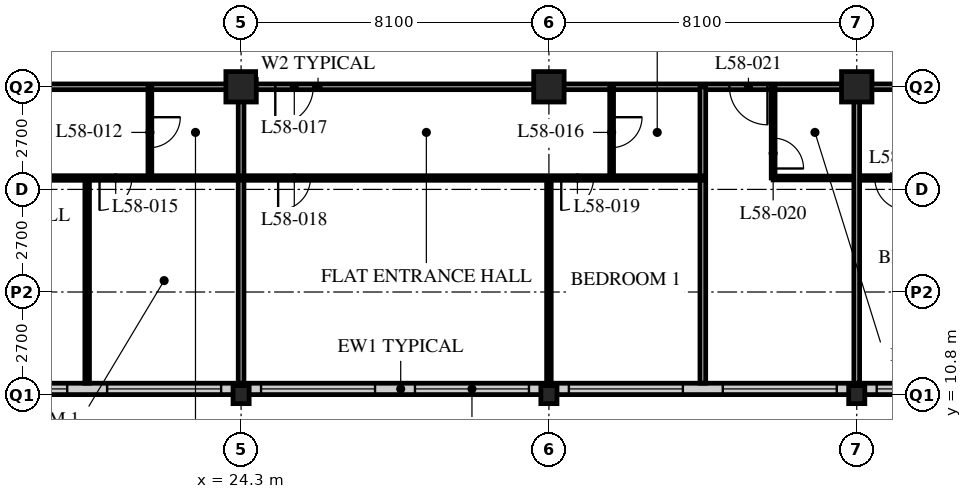
"""IFC4 building model, lengths in metres.
Left out: names, types, materials, properties, quantities, classifications, styles, units other than length and angle.
Written with IfcOpenShell. Run it as: python <this file> out.ifc"""

import sys

from ifc_helpers import new_model, si_unit, direction, frame, frame_2d, origin, origin_2d, place, context, subcontext, project, spatial, rectangle, hollow_rectangle, i_section, extrude, element, fill, save


model = new_model("IFC4")
c1 = context("Model", 3, precision=1e-05, world=origin(), true_north=direction((0.0, 1.0)))
c2 = subcontext(c1, "Body", "Model", "MODEL_VIEW")
j1 = project(units=[si_unit("LENGTHUNIT", "METRE"), si_unit("PLANEANGLEUNIT", "RADIAN")], contexts=[c1])
p1 = place(None, origin())
s1 = spatial("IfcSite", under=j1, at=p1, CompositionType="ELEMENT")
p2 = place(p1, origin())
s2 = spatial("IfcBuilding", under=s1, at=p2, CompositionType="ELEMENT")
p3 = place(p2, frame((0.0, 0.0, 224.4)))
s3 = spatial("IfcBuildingStorey", under=s2, at=p3, CompositionType="ELEMENT", Elevation=224.4)
p4 = place(p3, frame((24.3, 10.8, 0.0), z_axis=(0.0, 0.0, 1.0), x_axis=(1.0, 0.0, 0.0)))
e1 = element("IfcColumn", 1, at=p4, inside=s3, PredefinedType="COLUMN", context=c2, shape_type="SweptSolid", body=[
    extrude(i_section(OverallWidth=0.424, OverallDepth=0.475, WebThickness=0.048, FlangeThickness=0.077, FilletRadius=0.015, at=origin_2d()), origin(), (0.0, 0.0, 1.0), 3.6),
])
p5 = place(p3, frame((24.3, 18.9, 0.0), z_axis=(0.0, 0.0, 1.0), x_axis=(1.0, 0.0, 0.0)))
e2 = element("IfcColumn", 2, at=p5, inside=s3, PredefinedType="COLUMN", context=c2, shape_type="SweptSolid", body=[
    extrude(hollow_rectangle(XDim=0.8, YDim=0.8, WallThickness=0.08, at=origin_2d()), origin(), (0.0, 0.0, 1.0), 3.6),
])
p6 = place(p3, frame((32.4, 10.8, 0.0), z_axis=(0.0, 0.0, 1.0), x_axis=(1.0, 0.0, 0.0)))
e3 = element("IfcColumn", 3, at=p6, inside=s3, PredefinedType="COLUMN", context=c2, shape_type="SweptSolid", body=[
    extrude(i_section(OverallWidth=0.424, OverallDepth=0.475, WebThickness=0.048, FlangeThickness=0.077, FilletRadius=0.015, at=origin_2d()), origin(), (0.0, 0.0, 1.0), 3.6),
])
p7 = place(p3, frame((32.4, 18.9, 0.0), z_axis=(0.0, 0.0, 1.0), x_axis=(1.0, 0.0, 0.0)))
e4 = element("IfcColumn", 4, at=p7, inside=s3, PredefinedType="COLUMN", context=c2, shape_type="SweptSolid", body=[
    extrude(hollow_rectangle(XDim=0.8, YDim=0.8, WallThickness=0.08, at=origin_2d()), origin(), (0.0, 0.0, 1.0), 3.6),
])
p8 = place(p3, frame((40.5, 10.8, 0.0), z_axis=(0.0, 0.0, 1.0), x_axis=(1.0, 0.0, 0.0)))
e5 = element("IfcColumn", 5, at=p8, inside=s3, PredefinedType="COLUMN", context=c2, shape_type="SweptSolid", body=[
    extrude(i_section(OverallWidth=0.424, OverallDepth=0.475, WebThickness=0.048, FlangeThickness=0.077, FilletRadius=0.015, at=origin_2d()), origin(), (0.0, 0.0, 1.0), 3.6),
])
p9 = place(p3, frame((40.5, 18.9, 0.0), z_axis=(0.0, 0.0, 1.0), x_axis=(1.0, 0.0, 0.0)))
e6 = element("IfcColumn", 6, at=p9, inside=s3, PredefinedType="COLUMN", context=c2, shape_type="SweptSolid", body=[
    extrude(hollow_rectangle(XDim=0.8, YDim=0.8, WallThickness=0.08, at=origin_2d()), origin(), (0.0, 0.0, 1.0), 3.6),
])
p10 = place(p3, frame((8.4, 10.95, 0.0), z_axis=(0.0, 0.0, 1.0), x_axis=(1.0, 0.0, 0.0)))
e7 = element("IfcWall", 7, at=p10, inside=s3, PredefinedType="SOLIDWALL", context=c2, shape_type="SweptSolid", body=[
    extrude(rectangle(XDim=40.2, YDim=0.3, at=frame_2d((20.1, 0.0))), origin(), (0.0, 0.0, 1.0), 3.39),
])
p11 = place(p10, frame((0.225, 0.0, 0.6)))
e8 = element("IfcOpeningElement", 8, at=p11, cuts=e7, PredefinedType="OPENING", context=c2, shape_type="SweptSolid", body=[
    extrude(rectangle(XDim=3.0, YDim=2.0, at=frame_2d((1.5, 1.0))), frame((0.0, 0.16, 0.0), z_axis=(0.0, -1.0, 0.0), x_axis=(1.0, 0.0, 0.0)), (0.0, 0.0, 1.0), 0.32),
])
p12 = place(p10, frame((4.275, 0.0, 0.6)))
e9 = element("IfcOpeningElement", 9, at=p12, cuts=e7, PredefinedType="OPENING", context=c2, shape_type="SweptSolid", body=[
    extrude(rectangle(XDim=3.0, YDim=2.0, at=frame_2d((1.5, 1.0))), frame((0.0, 0.16, 0.0), z_axis=(0.0, -1.0, 0.0), x_axis=(1.0, 0.0, 0.0)), (0.0, 0.0, 1.0), 0.32),
])
p13 = place(p10, frame((8.325, 0.0, 0.6)))
e10 = element("IfcOpeningElement", 10, at=p13, cuts=e7, PredefinedType="OPENING", context=c2, shape_type="SweptSolid", body=[
    extrude(rectangle(XDim=3.0, YDim=2.0, at=frame_2d((1.5, 1.0))), frame((0.0, 0.16, 0.0), z_axis=(0.0, -1.0, 0.0), x_axis=(1.0, 0.0, 0.0)), (0.0, 0.0, 1.0), 0.32),
])
p14 = place(p10, frame((12.375, 0.0, 0.6)))
e11 = element("IfcOpeningElement", 11, at=p14, cuts=e7, PredefinedType="OPENING", context=c2, shape_type="SweptSolid", body=[
    extrude(rectangle(XDim=3.0, YDim=2.0, at=frame_2d((1.5, 1.0))), frame((0.0, 0.16, 0.0), z_axis=(0.0, -1.0, 0.0), x_axis=(1.0, 0.0, 0.0)), (0.0, 0.0, 1.0), 0.32),
])
p15 = place(p10, frame((16.425, 0.0, 0.6)))
e12 = element("IfcOpeningElement", 12, at=p15, cuts=e7, PredefinedType="OPENING", context=c2, shape_type="SweptSolid", body=[
    extrude(rectangle(XDim=3.0, YDim=2.0, at=frame_2d((1.5, 1.0))), frame((0.0, 0.16, 0.0), z_axis=(0.0, -1.0, 0.0), x_axis=(1.0, 0.0, 0.0)), (0.0, 0.0, 1.0), 0.32),
])
p16 = place(p10, frame((20.475, 0.0, 0.6)))
e13 = element("IfcOpeningElement", 13, at=p16, cuts=e7, PredefinedType="OPENING", context=c2, shape_type="SweptSolid", body=[
    extrude(rectangle(XDim=3.0, YDim=2.0, at=frame_2d((1.5, 1.0))), frame((0.0, 0.16, 0.0), z_axis=(0.0, -1.0, 0.0), x_axis=(1.0, 0.0, 0.0)), (0.0, 0.0, 1.0), 0.32),
])
p17 = place(p10, frame((24.525, 0.0, 0.6)))
e14 = element("IfcOpeningElement", 14, at=p17, cuts=e7, PredefinedType="OPENING", context=c2, shape_type="SweptSolid", body=[
    extrude(rectangle(XDim=3.0, YDim=2.0, at=frame_2d((1.5, 1.0))), frame((0.0, 0.16, 0.0), z_axis=(0.0, -1.0, 0.0), x_axis=(1.0, 0.0, 0.0)), (0.0, 0.0, 1.0), 0.32),
])
p18 = place(p10, frame((28.575, 0.0, 0.6)))
e15 = element("IfcOpeningElement", 15, at=p18, cuts=e7, PredefinedType="OPENING", context=c2, shape_type="SweptSolid", body=[
    extrude(rectangle(XDim=3.0, YDim=2.0, at=frame_2d((1.5, 1.0))), frame((0.0, 0.16, 0.0), z_axis=(0.0, -1.0, 0.0), x_axis=(1.0, 0.0, 0.0)), (0.0, 0.0, 1.0), 0.32),
])
p19 = place(p10, frame((32.625, 0.0, 0.6)))
e16 = element("IfcOpeningElement", 16, at=p19, cuts=e7, PredefinedType="OPENING", context=c2, shape_type="SweptSolid", body=[
    extrude(rectangle(XDim=3.0, YDim=2.0, at=frame_2d((1.5, 1.0))), frame((0.0, 0.16, 0.0), z_axis=(0.0, -1.0, 0.0), x_axis=(1.0, 0.0, 0.0)), (0.0, 0.0, 1.0), 0.32),
])
p20 = place(p10, frame((36.675, 0.0, 0.6)))
e17 = element("IfcOpeningElement", 17, at=p20, cuts=e7, PredefinedType="OPENING", context=c2, shape_type="SweptSolid", body=[
    extrude(rectangle(XDim=3.0, YDim=2.0, at=frame_2d((1.5, 1.0))), frame((0.0, 0.16, 0.0), z_axis=(0.0, -1.0, 0.0), x_axis=(1.0, 0.0, 0.0)), (0.0, 0.0, 1.0), 0.32),
])
p21 = place(p3, frame((8.1, 18.9, 0.0), z_axis=(0.0, 0.0, 1.0), x_axis=(1.0, 0.0, 0.0)))
e18 = element("IfcWall", 18, at=p21, inside=s3, PredefinedType="PARTITIONING", context=c2, shape_type="SweptSolid", body=[
    extrude(rectangle(XDim=36.45, YDim=0.15, at=frame_2d((18.225, 0.0))), origin(), (0.0, 0.0, 1.0), 2.628),
])
p22 = place(p21, frame((4.45, 0.0, 0.0)))
e19 = element("IfcOpeningElement", 19, at=p22, cuts=e18, PredefinedType="OPENING", context=c2, shape_type="SweptSolid", body=[
    extrude(rectangle(XDim=1.0, YDim=2.1, at=frame_2d((0.5, 1.05))), frame((0.0, 0.085, 0.0), z_axis=(0.0, -1.0, 0.0), x_axis=(1.0, 0.0, 0.0)), (0.0, 0.0, 1.0), 0.17),
])
p23 = place(p21, frame((17.1, 0.0, 0.0)))
e20 = element("IfcOpeningElement", 20, at=p23, cuts=e18, PredefinedType="OPENING", context=c2, shape_type="SweptSolid", body=[
    extrude(rectangle(XDim=1.0, YDim=2.1, at=frame_2d((0.5, 1.05))), frame((0.0, 0.085, 0.0), z_axis=(0.0, -1.0, 0.0), x_axis=(1.0, 0.0, 0.0)), (0.0, 0.0, 1.0), 0.17),
])
p24 = place(p21, frame((29.05, 0.0, 0.0)))
e21 = element("IfcOpeningElement", 21, at=p24, cuts=e18, PredefinedType="OPENING", context=c2, shape_type="SweptSolid", body=[
    extrude(rectangle(XDim=1.0, YDim=2.1, at=frame_2d((0.5, 1.05))), frame((0.0, 0.085, 0.0), z_axis=(0.0, -1.0, 0.0), x_axis=(1.0, 0.0, 0.0)), (0.0, 0.0, 1.0), 0.17),
])
p25 = place(p21, frame((2.625, 0.0, 0.0)))
e22 = element("IfcOpeningElement", 22, at=p25, cuts=e18, PredefinedType="OPENING", context=c2, shape_type="SweptSolid", body=[
    extrude(rectangle(XDim=1.0, YDim=2.1, at=frame_2d((0.5, 1.05))), frame((0.0, 0.085, 0.0), z_axis=(0.0, -1.0, 0.0), x_axis=(1.0, 0.0, 0.0)), (0.0, 0.0, 1.0), 0.17),
])
p26 = place(p21, frame((33.925, 0.0, 0.0)))
e23 = element("IfcOpeningElement", 23, at=p26, cuts=e18, PredefinedType="OPENING", context=c2, shape_type="SweptSolid", body=[
    extrude(rectangle(XDim=1.0, YDim=2.1, at=frame_2d((0.5, 1.05))), frame((0.0, 0.085, 0.0), z_axis=(0.0, -1.0, 0.0), x_axis=(1.0, 0.0, 0.0)), (0.0, 0.0, 1.0), 0.17),
])
p27 = place(p3, frame((21.9, 18.9, 0.0), z_axis=(0.0, 0.0, 1.0), x_axis=(0.0, -1.0, 0.0)))
e24 = element("IfcWall", 24, at=p27, inside=s3, PredefinedType="PARTITIONING", context=c2, shape_type="SweptSolid", body=[
    extrude(rectangle(XDim=2.4, YDim=0.1, at=frame_2d((1.2, 0.0))), origin(), (0.0, 0.0, 1.0), 3.39),
])
p28 = place(p27, frame((0.8, 0.0, 0.0)))
e25 = element("IfcOpeningElement", 25, at=p28, cuts=e24, PredefinedType="OPENING", context=c2, shape_type="SweptSolid", body=[
    extrude(rectangle(XDim=0.8, YDim=2.1, at=frame_2d((0.4, 1.05))), frame((0.0, 0.06, 0.0), z_axis=(0.0, -1.0, 0.0), x_axis=(1.0, 0.0, 0.0)), (0.0, 0.0, 1.0), 0.12),
])
p29 = place(p3, frame((20.25, 16.5, 0.0), z_axis=(0.0, 0.0, 1.0), x_axis=(0.0, -1.0, 0.0)))
e26 = element("IfcWall", 26, at=p29, inside=s3, PredefinedType="PARTITIONING", context=c2, shape_type="SweptSolid", body=[
    extrude(rectangle(XDim=5.4, YDim=0.12, at=frame_2d((2.7, 0.0))), origin(), (0.0, 0.0, 1.0), 3.39),
])
p30 = place(p3, frame((24.3, 18.9, 0.0), z_axis=(0.0, 0.0, 1.0), x_axis=(0.0, -1.0, 0.0)))
e27 = element("IfcWall", 27, at=p30, inside=s3, PredefinedType="PARTITIONING", context=c2, shape_type="SweptSolid", body=[
    extrude(rectangle(XDim=7.8, YDim=0.15, at=frame_2d((3.9, 0.0))), origin(), (0.0, 0.0, 1.0), 2.628),
])
p31 = place(p3, frame((34.05, 18.9, 0.0), z_axis=(0.0, 0.0, 1.0), x_axis=(0.0, -1.0, 0.0)))
e28 = element("IfcWall", 28, at=p31, inside=s3, PredefinedType="PARTITIONING", context=c2, shape_type="SweptSolid", body=[
    extrude(rectangle(XDim=2.4, YDim=0.1, at=frame_2d((1.2, 0.0))), origin(), (0.0, 0.0, 1.0), 3.39),
])
p32 = place(p31, frame((0.8, 0.0, 0.0)))
e29 = element("IfcOpeningElement", 29, at=p32, cuts=e28, PredefinedType="OPENING", context=c2, shape_type="SweptSolid", body=[
    extrude(rectangle(XDim=0.8, YDim=2.1, at=frame_2d((0.4, 1.05))), frame((0.0, 0.06, 0.0), z_axis=(0.0, -1.0, 0.0), x_axis=(1.0, 0.0, 0.0)), (0.0, 0.0, 1.0), 0.12),
])
p33 = place(p3, frame((32.4, 16.5, 0.0), z_axis=(0.0, 0.0, 1.0), x_axis=(0.0, -1.0, 0.0)))
e30 = element("IfcWall", 30, at=p33, inside=s3, PredefinedType="PARTITIONING", context=c2, shape_type="SweptSolid", body=[
    extrude(rectangle(XDim=5.4, YDim=0.12, at=frame_2d((2.7, 0.0))), origin(), (0.0, 0.0, 1.0), 2.628),
])
p34 = place(p3, frame((36.45, 18.9, 0.0), z_axis=(0.0, 0.0, 1.0), x_axis=(0.0, -1.0, 0.0)))
e31 = element("IfcWall", 31, at=p34, inside=s3, PredefinedType="PARTITIONING", context=c2, shape_type="SweptSolid", body=[
    extrude(rectangle(XDim=7.8, YDim=0.15, at=frame_2d((3.9, 0.0))), origin(), (0.0, 0.0, 1.0), 3.39),
])
p35 = place(p3, frame((38.3, 16.5, 0.0), z_axis=(0.0, 0.0, 1.0), x_axis=(1.0, 0.0, 0.0)))
e32 = element("IfcWall", 32, at=p35, inside=s3, PredefinedType="PARTITIONING", context=c2, shape_type="SweptSolid", body=[
    extrude(rectangle(XDim=2.2, YDim=0.1, at=frame_2d((1.1, 0.0))), origin(), (0.0, 0.0, 1.0), 3.39),
])
p36 = place(p3, frame((38.3, 18.9, 0.0), z_axis=(0.0, 0.0, 1.0), x_axis=(0.0, -1.0, 0.0)))
e33 = element("IfcWall", 33, at=p36, inside=s3, PredefinedType="PARTITIONING", context=c2, shape_type="SweptSolid", body=[
    extrude(rectangle(XDim=2.4, YDim=0.1, at=frame_2d((1.2, 0.0))), origin(), (0.0, 0.0, 1.0), 3.39),
])
p37 = place(p36, frame((1.35, 0.0, 0.0)))
e34 = element("IfcOpeningElement", 34, at=p37, cuts=e33, PredefinedType="OPENING", context=c2, shape_type="SweptSolid", body=[
    extrude(rectangle(XDim=0.8, YDim=2.1, at=frame_2d((0.4, 1.05))), frame((0.0, 0.06, 0.0), z_axis=(0.0, -1.0, 0.0), x_axis=(1.0, 0.0, 0.0)), (0.0, 0.0, 1.0), 0.12),
])
p38 = place(p3, frame((8.1, 16.5, 0.0), z_axis=(0.0, 0.0, 1.0), x_axis=(1.0, 0.0, 0.0)))
e35 = element("IfcWall", 35, at=p38, inside=s3, PredefinedType="PARTITIONING", context=c2, shape_type="SweptSolid", body=[
    extrude(rectangle(XDim=28.35, YDim=0.12, at=frame_2d((14.175, 0.0))), origin(), (0.0, 0.0, 1.0), 3.39),
])
p39 = place(p38, frame((5.025, 0.0, 0.0)))
e36 = element("IfcOpeningElement", 36, at=p39, cuts=e35, PredefinedType="OPENING", context=c2, shape_type="SweptSolid", body=[
    extrude(rectangle(XDim=0.85, YDim=2.1, at=frame_2d((0.425, 1.05))), frame((0.0, 0.07, 0.0), z_axis=(0.0, -1.0, 0.0), x_axis=(1.0, 0.0, 0.0)), (0.0, 0.0, 1.0), 0.14),
])
p40 = place(p38, frame((12.475, 0.0, 0.0)))
e37 = element("IfcOpeningElement", 37, at=p40, cuts=e35, PredefinedType="OPENING", context=c2, shape_type="SweptSolid", body=[
    extrude(rectangle(XDim=0.85, YDim=2.1, at=frame_2d((0.425, 1.05))), frame((0.0, 0.07, 0.0), z_axis=(0.0, -1.0, 0.0), x_axis=(1.0, 0.0, 0.0)), (0.0, 0.0, 1.0), 0.14),
])
p41 = place(p38, frame((17.175, 0.0, 0.0)))
e38 = element("IfcOpeningElement", 38, at=p41, cuts=e35, PredefinedType="OPENING", context=c2, shape_type="SweptSolid", body=[
    extrude(rectangle(XDim=0.85, YDim=2.1, at=frame_2d((0.425, 1.05))), frame((0.0, 0.07, 0.0), z_axis=(0.0, -1.0, 0.0), x_axis=(1.0, 0.0, 0.0)), (0.0, 0.0, 1.0), 0.14),
])
p42 = place(p38, frame((24.625, 0.0, 0.0)))
e39 = element("IfcOpeningElement", 39, at=p42, cuts=e35, PredefinedType="OPENING", context=c2, shape_type="SweptSolid", body=[
    extrude(rectangle(XDim=0.85, YDim=2.1, at=frame_2d((0.425, 1.05))), frame((0.0, 0.07, 0.0), z_axis=(0.0, -1.0, 0.0), x_axis=(1.0, 0.0, 0.0)), (0.0, 0.0, 1.0), 0.14),
])
p43 = place(p38, frame((2.725, 0.0, 0.0)))
e40 = element("IfcOpeningElement", 40, at=p43, cuts=e35, PredefinedType="OPENING", context=c2, shape_type="SweptSolid", body=[
    extrude(rectangle(XDim=0.85, YDim=2.1, at=frame_2d((0.425, 1.05))), frame((0.0, 0.07, 0.0), z_axis=(0.0, -1.0, 0.0), x_axis=(1.0, 0.0, 0.0)), (0.0, 0.0, 1.0), 0.14),
])
p44 = place(p3, frame((40.5, 16.5, 0.0), z_axis=(0.0, 0.0, 1.0), x_axis=(1.0, 0.0, 0.0)))
e41 = element("IfcWall", 41, at=p44, inside=s3, PredefinedType="PARTITIONING", context=c2, shape_type="SweptSolid", body=[
    extrude(rectangle(XDim=8.05, YDim=0.12, at=frame_2d((4.025, 0.0))), origin(), (0.0, 0.0, 1.0), 3.39),
])
p45 = place(p44, frame((0.475, 0.0, 0.0)))
e42 = element("IfcOpeningElement", 42, at=p45, cuts=e41, PredefinedType="OPENING", context=c2, shape_type="SweptSolid", body=[
    extrude(rectangle(XDim=0.85, YDim=2.1, at=frame_2d((0.425, 1.05))), frame((0.0, 0.07, 0.0), z_axis=(0.0, -1.0, 0.0), x_axis=(1.0, 0.0, 0.0)), (0.0, 0.0, 1.0), 0.14),
])
p46 = place(p44, frame((4.325, 0.0, 0.0)))
e43 = element("IfcOpeningElement", 43, at=p46, cuts=e41, PredefinedType="OPENING", context=c2, shape_type="SweptSolid", body=[
    extrude(rectangle(XDim=0.85, YDim=2.1, at=frame_2d((0.425, 1.05))), frame((0.0, 0.07, 0.0), z_axis=(0.0, -1.0, 0.0), x_axis=(1.0, 0.0, 0.0)), (0.0, 0.0, 1.0), 0.14),
])
p47 = place(p3, frame((40.5, 18.9, 0.0), z_axis=(0.0, 0.0, 1.0), x_axis=(0.0, -1.0, 0.0)))
e44 = element("IfcWall", 44, at=p47, inside=s3, PredefinedType="PARTITIONING", context=c2, shape_type="SweptSolid", body=[
    extrude(rectangle(XDim=7.8, YDim=0.15, at=frame_2d((3.9, 0.0))), origin(), (0.0, 0.0, 1.0), 2.628),
])
p48 = place(p13, origin())
e45 = element("IfcWindow", 45, at=p48, inside=s3, PartitioningType="SINGLE_PANEL", PredefinedType="WINDOW", context=c2, shape_type="SweptSolid", body=[
    extrude(rectangle(XDim=3.0, YDim=2.0, at=frame_2d((1.5, 1.0))), frame((0.0, 0.03, 0.0), z_axis=(0.0, -1.0, 0.0), x_axis=(1.0, 0.0, 0.0)), (0.0, 0.0, 1.0), 0.06),
])
fill(e10, e45)
p49 = place(p14, origin())
e46 = element("IfcWindow", 46, at=p49, inside=s3, PartitioningType="SINGLE_PANEL", PredefinedType="WINDOW", context=c2, shape_type="SweptSolid", body=[
    extrude(rectangle(XDim=3.0, YDim=2.0, at=frame_2d((1.5, 1.0))), frame((0.0, 0.03, 0.0), z_axis=(0.0, -1.0, 0.0), x_axis=(1.0, 0.0, 0.0)), (0.0, 0.0, 1.0), 0.06),
])
fill(e11, e46)
p50 = place(p15, origin())
e47 = element("IfcWindow", 47, at=p50, inside=s3, PartitioningType="SINGLE_PANEL", PredefinedType="WINDOW", context=c2, shape_type="SweptSolid", body=[
    extrude(rectangle(XDim=3.0, YDim=2.0, at=frame_2d((1.5, 1.0))), frame((0.0, 0.03, 0.0), z_axis=(0.0, -1.0, 0.0), x_axis=(1.0, 0.0, 0.0)), (0.0, 0.0, 1.0), 0.06),
])
fill(e12, e47)
p51 = place(p16, origin())
e48 = element("IfcWindow", 48, at=p51, inside=s3, PartitioningType="SINGLE_PANEL", PredefinedType="WINDOW", context=c2, shape_type="SweptSolid", body=[
    extrude(rectangle(XDim=3.0, YDim=2.0, at=frame_2d((1.5, 1.0))), frame((0.0, 0.03, 0.0), z_axis=(0.0, -1.0, 0.0), x_axis=(1.0, 0.0, 0.0)), (0.0, 0.0, 1.0), 0.06),
])
fill(e13, e48)
p52 = place(p17, origin())
e49 = element("IfcWindow", 49, at=p52, inside=s3, PartitioningType="SINGLE_PANEL", PredefinedType="WINDOW", context=c2, shape_type="SweptSolid", body=[
    extrude(rectangle(XDim=3.0, YDim=2.0, at=frame_2d((1.5, 1.0))), frame((0.0, 0.03, 0.0), z_axis=(0.0, -1.0, 0.0), x_axis=(1.0, 0.0, 0.0)), (0.0, 0.0, 1.0), 0.06),
])
fill(e14, e49)
p53 = place(p18, origin())
e50 = element("IfcWindow", 50, at=p53, inside=s3, PartitioningType="SINGLE_PANEL", PredefinedType="WINDOW", context=c2, shape_type="SweptSolid", body=[
    extrude(rectangle(XDim=3.0, YDim=2.0, at=frame_2d((1.5, 1.0))), frame((0.0, 0.03, 0.0), z_axis=(0.0, -1.0, 0.0), x_axis=(1.0, 0.0, 0.0)), (0.0, 0.0, 1.0), 0.06),
])
fill(e15, e50)
p54 = place(p19, origin())
e51 = element("IfcWindow", 51, at=p54, inside=s3, PartitioningType="SINGLE_PANEL", PredefinedType="WINDOW", context=c2, shape_type="SweptSolid", body=[
    extrude(rectangle(XDim=3.0, YDim=2.0, at=frame_2d((1.5, 1.0))), frame((0.0, 0.03, 0.0), z_axis=(0.0, -1.0, 0.0), x_axis=(1.0, 0.0, 0.0)), (0.0, 0.0, 1.0), 0.06),
])
fill(e16, e51)
p55 = place(p28, origin())
e52 = element("IfcDoor", 52, at=p55, inside=s3, OperationType="SINGLE_SWING_LEFT", PredefinedType="DOOR", context=c2, shape_type="SweptSolid", body=[
    extrude(rectangle(XDim=0.8, YDim=2.1, at=frame_2d((0.4, 1.05))), frame((0.0, 0.025, 0.0), z_axis=(0.0, -1.0, 0.0), x_axis=(1.0, 0.0, 0.0)), (0.0, 0.0, 1.0), 0.05),
])
fill(e25, e52)
p56 = place(p40, origin())
e53 = element("IfcDoor", 53, at=p56, inside=s3, OperationType="SINGLE_SWING_RIGHT", PredefinedType="DOOR", context=c2, shape_type="SweptSolid", body=[
    extrude(rectangle(XDim=0.85, YDim=2.1, at=frame_2d((0.425, 1.05))), frame((0.0, 0.025, 0.0), z_axis=(0.0, -1.0, 0.0), x_axis=(1.0, 0.0, 0.0)), (0.0, 0.0, 1.0), 0.05),
])
fill(e37, e53)
p57 = place(p32, origin())
e54 = element("IfcDoor", 54, at=p57, inside=s3, OperationType="SINGLE_SWING_LEFT", PredefinedType="DOOR", context=c2, shape_type="SweptSolid", body=[
    extrude(rectangle(XDim=0.8, YDim=2.1, at=frame_2d((0.4, 1.05))), frame((0.0, 0.025, 0.0), z_axis=(0.0, -1.0, 0.0), x_axis=(1.0, 0.0, 0.0)), (0.0, 0.0, 1.0), 0.05),
])
fill(e29, e54)
p58 = place(p23, origin())
e55 = element("IfcDoor", 55, at=p58, inside=s3, OperationType="SINGLE_SWING_RIGHT", PredefinedType="DOOR", context=c2, shape_type="SweptSolid", body=[
    extrude(rectangle(XDim=1.0, YDim=2.1, at=frame_2d((0.5, 1.05))), frame((0.0, 0.025, 0.0), z_axis=(0.0, -1.0, 0.0), x_axis=(1.0, 0.0, 0.0)), (0.0, 0.0, 1.0), 0.05),
])
fill(e20, e55)
p59 = place(p41, origin())
e56 = element("IfcDoor", 56, at=p59, inside=s3, OperationType="SINGLE_SWING_RIGHT", PredefinedType="DOOR", context=c2, shape_type="SweptSolid", body=[
    extrude(rectangle(XDim=0.85, YDim=2.1, at=frame_2d((0.425, 1.05))), frame((0.0, 0.025, 0.0), z_axis=(0.0, -1.0, 0.0), x_axis=(1.0, 0.0, 0.0)), (0.0, 0.0, 1.0), 0.05),
])
fill(e38, e56)
p60 = place(p42, origin())
e57 = element("IfcDoor", 57, at=p60, inside=s3, OperationType="SINGLE_SWING_RIGHT", PredefinedType="DOOR", context=c2, shape_type="SweptSolid", body=[
    extrude(rectangle(XDim=0.85, YDim=2.1, at=frame_2d((0.425, 1.05))), frame((0.0, 0.025, 0.0), z_axis=(0.0, -1.0, 0.0), x_axis=(1.0, 0.0, 0.0)), (0.0, 0.0, 1.0), 0.05),
])
fill(e39, e57)
p61 = place(p37, origin())
e58 = element("IfcDoor", 58, at=p61, inside=s3, OperationType="SINGLE_SWING_RIGHT", PredefinedType="DOOR", context=c2, shape_type="SweptSolid", body=[
    extrude(rectangle(XDim=0.8, YDim=2.1, at=frame_2d((0.4, 1.05))), frame((0.0, 0.025, 0.0), z_axis=(0.0, -1.0, 0.0), x_axis=(1.0, 0.0, 0.0)), (0.0, 0.0, 1.0), 0.05),
])
fill(e34, e58)
p62 = place(p24, origin())
e59 = element("IfcDoor", 59, at=p62, inside=s3, OperationType="SINGLE_SWING_LEFT", PredefinedType="DOOR", context=c2, shape_type="SweptSolid", body=[
    extrude(rectangle(XDim=1.0, YDim=2.1, at=frame_2d((0.5, 1.05))), frame((0.0, 0.025, 0.0), z_axis=(0.0, -1.0, 0.0), x_axis=(1.0, 0.0, 0.0)), (0.0, 0.0, 1.0), 0.05),
])
fill(e21, e59)
p63 = place(p45, origin())
e60 = element("IfcDoor", 60, at=p63, inside=s3, OperationType="SINGLE_SWING_LEFT", PredefinedType="DOOR", context=c2, shape_type="SweptSolid", body=[
    extrude(rectangle(XDim=0.85, YDim=2.1, at=frame_2d((0.425, 1.05))), frame((0.0, 0.025, 0.0), z_axis=(0.0, -1.0, 0.0), x_axis=(1.0, 0.0, 0.0)), (0.0, 0.0, 1.0), 0.05),
])
fill(e42, e60)
save(model, sys.argv[1])
